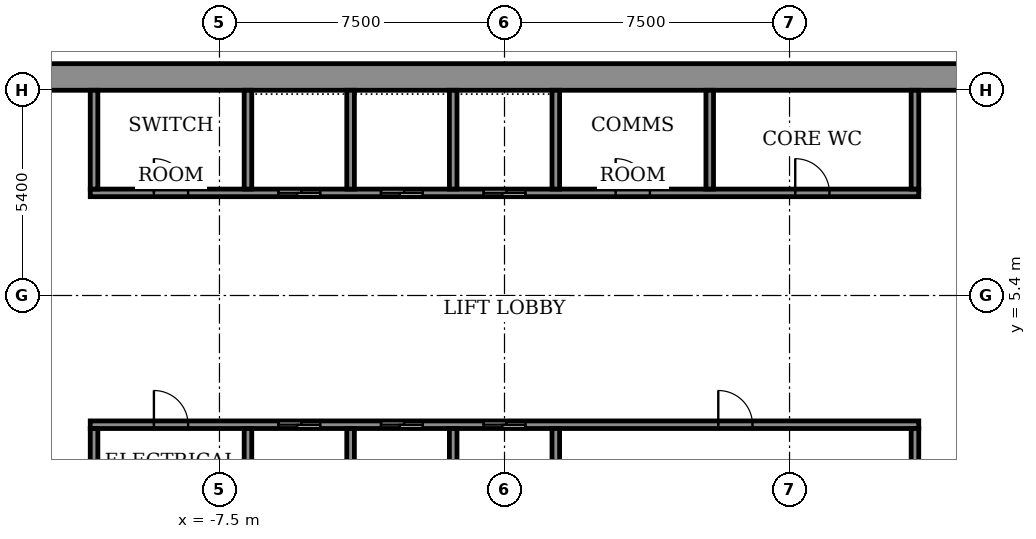
"""IFC4 building model, lengths in metres.
Left out: names, types, materials, properties, quantities, classifications, styles, units other than length and angle.
Written with IfcOpenShell. Run it as: python <this file> out.ifc"""

import sys

from ifc_helpers import new_model, si_unit, direction, frame, frame_2d, origin, place, context, subcontext, project, spatial, rectangle, extrude, element, fill, save


model = new_model("IFC4")
c1 = context("Model", 3, precision=1e-05, world=origin(), true_north=direction((0.0, 1.0)))
c2 = subcontext(c1, "Body", "Model", "MODEL_VIEW")
j1 = project(units=[si_unit("LENGTHUNIT", "METRE"), si_unit("PLANEANGLEUNIT", "RADIAN")], contexts=[c1])
p1 = place(None, origin())
s1 = spatial("IfcSite", under=j1, at=p1, CompositionType="ELEMENT")
p2 = place(p1, origin())
s2 = spatial("IfcBuilding", under=s1, at=p2, CompositionType="ELEMENT")
p3 = place(p2, frame((0.0, 0.0, 297.9)))
s3 = spatial("IfcBuildingStorey", under=s2, at=p3, CompositionType="ELEMENT", Elevation=297.9)
p4 = place(p3, frame((-14.5, 11.15, 0.0), z_axis=(0.0, 0.0, 1.0), x_axis=(1.0, 0.0, 0.0)))
e1 = element("IfcWall", 1, at=p4, inside=s3, PredefinedType="SHEAR", context=c2, shape_type="SweptSolid", body=[
    extrude(rectangle(XDim=29.0, YDim=0.7, at=frame_2d((14.5, 0.0))), origin(), (0.0, 0.0, 1.0), 3.6),
])
p5 = place(p3, frame((-10.9, 2.0, 0.0), z_axis=(0.0, 0.0, 1.0), x_axis=(1.0, 0.0, 0.0)))
e2 = element("IfcWall", 2, at=p5, inside=s3, PredefinedType="SHEAR", context=c2, shape_type="SweptSolid", body=[
    extrude(rectangle(XDim=21.8, YDim=0.2, at=frame_2d((10.9, 0.0))), origin(), (0.0, 0.0, 1.0), 3.05),
])
p6 = place(p5, frame((4.95, 0.0, 0.0)))
e3 = element("IfcOpeningElement", 3, at=p6, cuts=e2, PredefinedType="OPENING", context=c2, shape_type="SweptSolid", body=[
    extrude(rectangle(XDim=1.1, YDim=2.1, at=frame_2d((0.55, 1.05))), frame((0.0, 0.11, 0.0), z_axis=(0.0, -1.0, 0.0), x_axis=(1.0, 0.0, 0.0)), (0.0, 0.0, 1.0), 0.22),
])
p7 = place(p5, frame((7.65, 0.0, 0.0)))
e4 = element("IfcOpeningElement", 4, at=p7, cuts=e2, PredefinedType="OPENING", context=c2, shape_type="SweptSolid", body=[
    extrude(rectangle(XDim=1.1, YDim=2.1, at=frame_2d((0.55, 1.05))), frame((0.0, 0.11, 0.0), z_axis=(0.0, -1.0, 0.0), x_axis=(1.0, 0.0, 0.0)), (0.0, 0.0, 1.0), 0.22),
])
p8 = place(p5, frame((10.35, 0.0, 0.0)))
e5 = element("IfcOpeningElement", 5, at=p8, cuts=e2, PredefinedType="OPENING", context=c2, shape_type="SweptSolid", body=[
    extrude(rectangle(XDim=1.1, YDim=2.1, at=frame_2d((0.55, 1.05))), frame((0.0, 0.11, 0.0), z_axis=(0.0, -1.0, 0.0), x_axis=(1.0, 0.0, 0.0)), (0.0, 0.0, 1.0), 0.22),
])
p9 = place(p5, frame((1.675, 0.0, 0.0)))
e6 = element("IfcOpeningElement", 6, at=p9, cuts=e2, PredefinedType="OPENING", context=c2, shape_type="SweptSolid", body=[
    extrude(rectangle(XDim=0.9, YDim=2.1, at=frame_2d((0.45, 1.05))), frame((0.0, 0.11, 0.0), z_axis=(0.0, -1.0, 0.0), x_axis=(1.0, 0.0, 0.0)), (0.0, 0.0, 1.0), 0.22),
])
p10 = place(p5, frame((16.525, 0.0, 0.0)))
e7 = element("IfcOpeningElement", 7, at=p10, cuts=e2, PredefinedType="OPENING", context=c2, shape_type="SweptSolid", body=[
    extrude(rectangle(XDim=0.9, YDim=2.1, at=frame_2d((0.45, 1.05))), frame((0.0, 0.11, 0.0), z_axis=(0.0, -1.0, 0.0), x_axis=(1.0, 0.0, 0.0)), (0.0, 0.0, 1.0), 0.22),
])
p11 = place(p3, frame((-10.9, 8.1, 0.0), z_axis=(0.0, 0.0, 1.0), x_axis=(1.0, 0.0, 0.0)))
e8 = element("IfcWall", 8, at=p11, inside=s3, PredefinedType="SHEAR", context=c2, shape_type="SweptSolid", body=[
    extrude(rectangle(XDim=21.8, YDim=0.2, at=frame_2d((10.9, 0.0))), origin(), (0.0, 0.0, 1.0), 3.05),
])
p12 = place(p11, frame((4.95, 0.0, 0.0)))
e9 = element("IfcOpeningElement", 9, at=p12, cuts=e8, PredefinedType="OPENING", context=c2, shape_type="SweptSolid", body=[
    extrude(rectangle(XDim=1.1, YDim=2.1, at=frame_2d((0.55, 1.05))), frame((0.0, 0.11, 0.0), z_axis=(0.0, -1.0, 0.0), x_axis=(1.0, 0.0, 0.0)), (0.0, 0.0, 1.0), 0.22),
])
p13 = place(p11, frame((7.65, 0.0, 0.0)))
e10 = element("IfcOpeningElement", 10, at=p13, cuts=e8, PredefinedType="OPENING", context=c2, shape_type="SweptSolid", body=[
    extrude(rectangle(XDim=1.1, YDim=2.1, at=frame_2d((0.55, 1.05))), frame((0.0, 0.11, 0.0), z_axis=(0.0, -1.0, 0.0), x_axis=(1.0, 0.0, 0.0)), (0.0, 0.0, 1.0), 0.22),
])
p14 = place(p11, frame((10.35, 0.0, 0.0)))
e11 = element("IfcOpeningElement", 11, at=p14, cuts=e8, PredefinedType="OPENING", context=c2, shape_type="SweptSolid", body=[
    extrude(rectangle(XDim=1.1, YDim=2.1, at=frame_2d((0.55, 1.05))), frame((0.0, 0.11, 0.0), z_axis=(0.0, -1.0, 0.0), x_axis=(1.0, 0.0, 0.0)), (0.0, 0.0, 1.0), 0.22),
])
p15 = place(p11, frame((1.675, 0.0, 0.0)))
e12 = element("IfcOpeningElement", 12, at=p15, cuts=e8, PredefinedType="OPENING", context=c2, shape_type="SweptSolid", body=[
    extrude(rectangle(XDim=0.9, YDim=2.1, at=frame_2d((0.45, 1.05))), frame((0.0, 0.11, 0.0), z_axis=(0.0, -1.0, 0.0), x_axis=(1.0, 0.0, 0.0)), (0.0, 0.0, 1.0), 0.22),
])
p16 = place(p11, frame((13.825, 0.0, 0.0)))
e13 = element("IfcOpeningElement", 13, at=p16, cuts=e8, PredefinedType="OPENING", context=c2, shape_type="SweptSolid", body=[
    extrude(rectangle(XDim=0.9, YDim=2.1, at=frame_2d((0.45, 1.05))), frame((0.0, 0.11, 0.0), z_axis=(0.0, -1.0, 0.0), x_axis=(1.0, 0.0, 0.0)), (0.0, 0.0, 1.0), 0.22),
])
p17 = place(p11, frame((18.55, 0.0, 0.0)))
e14 = element("IfcOpeningElement", 14, at=p17, cuts=e8, PredefinedType="OPENING", context=c2, shape_type="SweptSolid", body=[
    extrude(rectangle(XDim=0.9, YDim=2.1, at=frame_2d((0.45, 1.05))), frame((0.0, 0.11, 0.0), z_axis=(0.0, -1.0, 0.0), x_axis=(1.0, 0.0, 0.0)), (0.0, 0.0, 1.0), 0.22),
])
p18 = place(p3, frame((-10.8, -0.6, 0.0), z_axis=(0.0, 0.0, 1.0), x_axis=(0.0, 1.0, 0.0)))
e15 = element("IfcWall", 15, at=p18, inside=s3, PredefinedType="STANDARD", context=c2, shape_type="SweptSolid", body=[
    extrude(rectangle(XDim=2.5, YDim=0.2, at=frame_2d((1.25, 0.0))), origin(), (0.0, 0.0, 1.0), 3.05),
])
for number, where, z_axis, x_axis in (
    (16, (-6.75, -0.6, 0.0), (0.0, 0.0, 1.0), (0.0, 1.0, 0.0)),
    (17, (-4.05, -0.6, 0.0), (0.0, 0.0, 1.0), (0.0, 1.0, 0.0)),
    (18, (-1.35, -0.6, 0.0), (0.0, 0.0, 1.0), (0.0, 1.0, 0.0)),
    (19, (1.35, -0.6, 0.0), (0.0, 0.0, 1.0), (0.0, 1.0, 0.0)),
):
    element("IfcWall", number, at=place(p3, frame(where, z_axis=z_axis, x_axis=x_axis)), inside=s3, PredefinedType="SHEAR", context=c2, shape_type="SweptSolid", body=[
        extrude(rectangle(XDim=2.5, YDim=0.2, at=frame_2d((1.25, 0.0))), origin(), (0.0, 0.0, 1.0), 3.05),
    ])
p19 = place(p3, frame((10.8, -0.6, 0.0), z_axis=(0.0, 0.0, 1.0), x_axis=(0.0, 1.0, 0.0)))
e20 = element("IfcWall", 20, at=p19, inside=s3, PredefinedType="STANDARD", context=c2, shape_type="SweptSolid", body=[
    extrude(rectangle(XDim=2.5, YDim=0.2, at=frame_2d((1.25, 0.0))), origin(), (0.0, 0.0, 1.0), 3.05),
])
p20 = place(p3, frame((-10.8, 8.2, 0.0), z_axis=(0.0, 0.0, 1.0), x_axis=(0.0, 1.0, 0.0)))
e21 = element("IfcWall", 21, at=p20, inside=s3, PredefinedType="STANDARD", context=c2, shape_type="SweptSolid", body=[
    extrude(rectangle(XDim=2.6, YDim=0.2, at=frame_2d((1.3, 0.0))), origin(), (0.0, 0.0, 1.0), 3.05),
])
for number, where, z_axis, x_axis in (
    (22, (-6.75, 8.2, 0.0), (0.0, 0.0, 1.0), (0.0, 1.0, 0.0)),
    (23, (-4.05, 8.2, 0.0), (0.0, 0.0, 1.0), (0.0, 1.0, 0.0)),
    (24, (-1.35, 8.2, 0.0), (0.0, 0.0, 1.0), (0.0, 1.0, 0.0)),
    (25, (1.35, 8.2, 0.0), (0.0, 0.0, 1.0), (0.0, 1.0, 0.0)),
):
    element("IfcWall", number, at=place(p3, frame(where, z_axis=z_axis, x_axis=x_axis)), inside=s3, PredefinedType="SHEAR", context=c2, shape_type="SweptSolid", body=[
        extrude(rectangle(XDim=2.6, YDim=0.2, at=frame_2d((1.3, 0.0))), origin(), (0.0, 0.0, 1.0), 3.05),
    ])
for number, where, z_axis, x_axis in (
    (26, (5.4, 8.2, 0.0), (0.0, 0.0, 1.0), (0.0, 1.0, 0.0)),
    (27, (10.8, 8.2, 0.0), (0.0, 0.0, 1.0), (0.0, 1.0, 0.0)),
):
    element("IfcWall", number, at=place(p3, frame(where, z_axis=z_axis, x_axis=x_axis)), inside=s3, PredefinedType="STANDARD", context=c2, shape_type="SweptSolid", body=[
        extrude(rectangle(XDim=2.6, YDim=0.2, at=frame_2d((1.3, 0.0))), origin(), (0.0, 0.0, 1.0), 3.05),
    ])
p21 = place(p6, origin())
e28 = element("IfcDoor", 28, at=p21, inside=s3, OperationType="SLIDING_TO_LEFT", PredefinedType="DOOR", context=c2, shape_type="SweptSolid", body=[
    extrude(rectangle(XDim=1.1, YDim=2.1, at=frame_2d((0.55, 1.05))), frame((0.0, 0.025, 0.0), z_axis=(0.0, -1.0, 0.0), x_axis=(1.0, 0.0, 0.0)), (0.0, 0.0, 1.0), 0.05),
])
fill(e3, e28)
p22 = place(p7, origin())
e29 = element("IfcDoor", 29, at=p22, inside=s3, OperationType="SLIDING_TO_LEFT", PredefinedType="DOOR", context=c2, shape_type="SweptSolid", body=[
    extrude(rectangle(XDim=1.1, YDim=2.1, at=frame_2d((0.55, 1.05))), frame((0.0, 0.025, 0.0), z_axis=(0.0, -1.0, 0.0), x_axis=(1.0, 0.0, 0.0)), (0.0, 0.0, 1.0), 0.05),
])
fill(e4, e29)
p23 = place(p8, origin())
e30 = element("IfcDoor", 30, at=p23, inside=s3, OperationType="SLIDING_TO_LEFT", PredefinedType="DOOR", context=c2, shape_type="SweptSolid", body=[
    extrude(rectangle(XDim=1.1, YDim=2.1, at=frame_2d((0.55, 1.05))), frame((0.0, 0.025, 0.0), z_axis=(0.0, -1.0, 0.0), x_axis=(1.0, 0.0, 0.0)), (0.0, 0.0, 1.0), 0.05),
])
fill(e5, e30)
p24 = place(p12, origin())
e31 = element("IfcDoor", 31, at=p24, inside=s3, OperationType="SLIDING_TO_LEFT", PredefinedType="DOOR", context=c2, shape_type="SweptSolid", body=[
    extrude(rectangle(XDim=1.1, YDim=2.1, at=frame_2d((0.55, 1.05))), frame((0.0, 0.025, 0.0), z_axis=(0.0, -1.0, 0.0), x_axis=(1.0, 0.0, 0.0)), (0.0, 0.0, 1.0), 0.05),
])
fill(e9, e31)
p25 = place(p13, origin())
e32 = element("IfcDoor", 32, at=p25, inside=s3, OperationType="SLIDING_TO_LEFT", PredefinedType="DOOR", context=c2, shape_type="SweptSolid", body=[
    extrude(rectangle(XDim=1.1, YDim=2.1, at=frame_2d((0.55, 1.05))), frame((0.0, 0.025, 0.0), z_axis=(0.0, -1.0, 0.0), x_axis=(1.0, 0.0, 0.0)), (0.0, 0.0, 1.0), 0.05),
])
fill(e10, e32)
p26 = place(p14, origin())
e33 = element("IfcDoor", 33, at=p26, inside=s3, OperationType="SLIDING_TO_LEFT", PredefinedType="DOOR", context=c2, shape_type="SweptSolid", body=[
    extrude(rectangle(XDim=1.1, YDim=2.1, at=frame_2d((0.55, 1.05))), frame((0.0, 0.025, 0.0), z_axis=(0.0, -1.0, 0.0), x_axis=(1.0, 0.0, 0.0)), (0.0, 0.0, 1.0), 0.05),
])
fill(e11, e33)
p27 = place(p9, origin())
e34 = element("IfcDoor", 34, at=p27, inside=s3, OperationType="SINGLE_SWING_LEFT", PredefinedType="DOOR", context=c2, shape_type="SweptSolid", body=[
    extrude(rectangle(XDim=0.9, YDim=2.1, at=frame_2d((0.45, 1.05))), frame((0.0, 0.025, 0.0), z_axis=(0.0, -1.0, 0.0), x_axis=(1.0, 0.0, 0.0)), (0.0, 0.0, 1.0), 0.05),
])
fill(e6, e34)
p28 = place(p10, origin())
e35 = element("IfcDoor", 35, at=p28, inside=s3, OperationType="SINGLE_SWING_RIGHT", PredefinedType="DOOR", context=c2, shape_type="SweptSolid", body=[
    extrude(rectangle(XDim=0.9, YDim=2.1, at=frame_2d((0.45, 1.05))), frame((0.0, 0.025, 0.0), z_axis=(0.0, -1.0, 0.0), x_axis=(1.0, 0.0, 0.0)), (0.0, 0.0, 1.0), 0.05),
])
fill(e7, e35)
p29 = place(p15, origin())
e36 = element("IfcDoor", 36, at=p29, inside=s3, OperationType="SINGLE_SWING_LEFT", PredefinedType="DOOR", context=c2, shape_type="SweptSolid", body=[
    extrude(rectangle(XDim=0.9, YDim=2.1, at=frame_2d((0.45, 1.05))), frame((0.0, 0.025, 0.0), z_axis=(0.0, -1.0, 0.0), x_axis=(1.0, 0.0, 0.0)), (0.0, 0.0, 1.0), 0.05),
])
fill(e12, e36)
p30 = place(p16, origin())
e37 = element("IfcDoor", 37, at=p30, inside=s3, OperationType="SINGLE_SWING_LEFT", PredefinedType="DOOR", context=c2, shape_type="SweptSolid", body=[
    extrude(rectangle(XDim=0.9, YDim=2.1, at=frame_2d((0.45, 1.05))), frame((0.0, 0.025, 0.0), z_axis=(0.0, -1.0, 0.0), x_axis=(1.0, 0.0, 0.0)), (0.0, 0.0, 1.0), 0.05),
])
fill(e13, e37)
p31 = place(p17, origin())
e38 = element("IfcDoor", 38, at=p31, inside=s3, OperationType="SINGLE_SWING_RIGHT", PredefinedType="DOOR", context=c2, shape_type="SweptSolid", body=[
    extrude(rectangle(XDim=0.9, YDim=2.1, at=frame_2d((0.45, 1.05))), frame((0.0, 0.025, 0.0), z_axis=(0.0, -1.0, 0.0), x_axis=(1.0, 0.0, 0.0)), (0.0, 0.0, 1.0), 0.05),
])
fill(e14, e38)
save(model, sys.argv[1])
